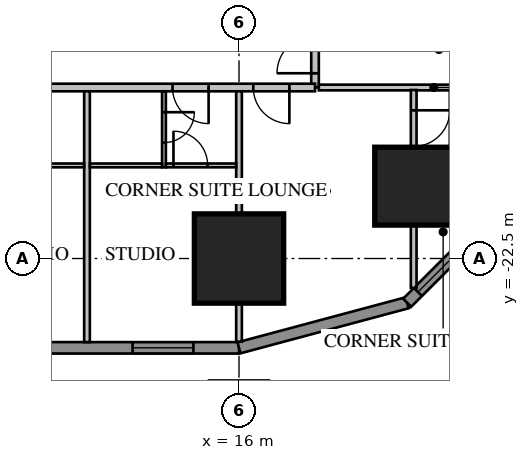
"""IFC4 building model, lengths in metres.
Left out: names, types, materials, properties, quantities, classifications, styles, units other than length and angle.
Written with IfcOpenShell. Run it as: python <this file> out.ifc"""

import sys

from ifc_helpers import new_model, si_unit, direction, frame, frame_2d, origin, origin_2d, place, context, subcontext, project, spatial, rectangle, extrude, element, fill, save


model = new_model("IFC4")
c1 = context("Model", 3, precision=1e-05, world=origin(), true_north=direction((0.0, 1.0)))
c2 = subcontext(c1, "Body", "Model", "MODEL_VIEW")
j1 = project(units=[si_unit("LENGTHUNIT", "METRE"), si_unit("PLANEANGLEUNIT", "RADIAN")], contexts=[c1])
p1 = place(None, origin())
s1 = spatial("IfcSite", under=j1, at=p1, CompositionType="ELEMENT")
p2 = place(p1, origin())
s2 = spatial("IfcBuilding", under=s1, at=p2, CompositionType="ELEMENT")
p3 = place(p2, frame((0.0, 0.0, 31.4)))
s3 = spatial("IfcBuildingStorey", under=s2, at=p3, CompositionType="ELEMENT", Elevation=31.4)
p4 = place(p3, frame((16.0, -22.5, 0.0), z_axis=(0.0, 0.0, 1.0), x_axis=(1.0, 0.0, 0.0)))
e1 = element("IfcColumn", 1, at=p4, inside=s3, PredefinedType="COLUMN", context=c2, shape_type="SweptSolid", body=[
    extrude(rectangle(XDim=2.35, YDim=2.35, at=origin_2d()), origin(), (0.0, 0.0, 1.0), 3.85),
])
p5 = place(p3, frame((20.596, -20.596, 0.0), z_axis=(0.0, 0.0, 1.0), x_axis=(1.0, 0.0, 0.0)))
e2 = element("IfcColumn", 2, at=p5, inside=s3, PredefinedType="COLUMN", context=c2, shape_type="SweptSolid", body=[
    extrude(rectangle(XDim=2.05, YDim=2.05, at=origin_2d()), origin(), (0.0, 0.0, 1.0), 3.85),
])
p6 = place(p3, frame((-16.0, -24.85, 0.0), z_axis=(0.0, 0.0, 1.0), x_axis=(1.0, 0.0, 0.0)))
e3 = element("IfcWall", 3, at=p6, inside=s3, PredefinedType="SOLIDWALL", context=c2, shape_type="SweptSolid", body=[
    extrude(rectangle(XDim=32.0, YDim=0.3, at=frame_2d((16.0, 0.0))), origin(), (0.0, 0.0, 1.0), 3.65),
])
p7 = place(p6, frame((1.2, 0.0, 0.75)))
e4 = element("IfcOpeningElement", 4, at=p7, cuts=e3, PredefinedType="OPENING", context=c2, shape_type="SweptSolid", body=[
    extrude(rectangle(XDim=1.6, YDim=1.8, at=frame_2d((0.8, 0.9))), frame((0.0, 0.17, 0.0), z_axis=(0.0, -1.0, 0.0), x_axis=(1.0, 0.0, 0.0)), (0.0, 0.0, 1.0), 0.34),
])
p8 = place(p6, frame((5.2, 0.0, 0.75)))
e5 = element("IfcOpeningElement", 5, at=p8, cuts=e3, PredefinedType="OPENING", context=c2, shape_type="SweptSolid", body=[
    extrude(rectangle(XDim=1.6, YDim=1.8, at=frame_2d((0.8, 0.9))), frame((0.0, 0.17, 0.0), z_axis=(0.0, -1.0, 0.0), x_axis=(1.0, 0.0, 0.0)), (0.0, 0.0, 1.0), 0.34),
])
p9 = place(p6, frame((17.2, 0.0, 0.75)))
e6 = element("IfcOpeningElement", 6, at=p9, cuts=e3, PredefinedType="OPENING", context=c2, shape_type="SweptSolid", body=[
    extrude(rectangle(XDim=1.6, YDim=1.8, at=frame_2d((0.8, 0.9))), frame((0.0, 0.17, 0.0), z_axis=(0.0, -1.0, 0.0), x_axis=(1.0, 0.0, 0.0)), (0.0, 0.0, 1.0), 0.34),
])
p10 = place(p6, frame((21.2, 0.0, 0.75)))
e7 = element("IfcOpeningElement", 7, at=p10, cuts=e3, PredefinedType="OPENING", context=c2, shape_type="SweptSolid", body=[
    extrude(rectangle(XDim=1.6, YDim=1.8, at=frame_2d((0.8, 0.9))), frame((0.0, 0.17, 0.0), z_axis=(0.0, -1.0, 0.0), x_axis=(1.0, 0.0, 0.0)), (0.0, 0.0, 1.0), 0.34),
])
p11 = place(p6, frame((25.2, 0.0, 0.75)))
e8 = element("IfcOpeningElement", 8, at=p11, cuts=e3, PredefinedType="OPENING", context=c2, shape_type="SweptSolid", body=[
    extrude(rectangle(XDim=1.6, YDim=1.8, at=frame_2d((0.8, 0.9))), frame((0.0, 0.17, 0.0), z_axis=(0.0, -1.0, 0.0), x_axis=(1.0, 0.0, 0.0)), (0.0, 0.0, 1.0), 0.34),
])
p12 = place(p6, frame((29.2, 0.0, 0.75)))
e9 = element("IfcOpeningElement", 9, at=p12, cuts=e3, PredefinedType="OPENING", context=c2, shape_type="SweptSolid", body=[
    extrude(rectangle(XDim=1.6, YDim=1.8, at=frame_2d((0.8, 0.9))), frame((0.0, 0.17, 0.0), z_axis=(0.0, -1.0, 0.0), x_axis=(1.0, 0.0, 0.0)), (0.0, 0.0, 1.0), 0.34),
])
p13 = place(p6, frame((8.8, 0.0, 0.75)))
e10 = element("IfcOpeningElement", 10, at=p13, cuts=e3, PredefinedType="OPENING", context=c2, shape_type="SweptSolid", body=[
    extrude(rectangle(XDim=2.4, YDim=1.8, at=frame_2d((1.2, 0.9))), frame((0.0, 0.17, 0.0), z_axis=(0.0, -1.0, 0.0), x_axis=(1.0, 0.0, 0.0)), (0.0, 0.0, 1.0), 0.34),
])
p14 = place(p6, frame((13.812, 0.0, 0.0)))
e11 = element("IfcOpeningElement", 11, at=p14, cuts=e3, PredefinedType="OPENING", context=c2, shape_type="SweptSolid", body=[
    extrude(rectangle(XDim=1.0, YDim=2.4, at=frame_2d((0.5, 1.2))), frame((0.0, 0.17, 0.0), z_axis=(0.0, -1.0, 0.0), x_axis=(1.0, 0.0, 0.0)), (0.0, 0.0, 1.0), 0.34),
])
p15 = place(p3, frame((16.0, -24.85, 0.0), z_axis=(0.0, 0.0, 1.0), x_axis=(0.965920218567, 0.258839972501, 0.0)))
e12 = element("IfcWall", 12, at=p15, inside=s3, PredefinedType="SOLIDWALL", context=c2, shape_type="SweptSolid", body=[
    extrude(rectangle(XDim=4.581, YDim=0.3, at=frame_2d((2.291, 0.0))), origin(), (0.0, 0.0, 1.0), 3.65),
])
p16 = place(p3, frame((20.425, -23.664, 0.0), z_axis=(0.0, 0.0, 1.0), x_axis=(0.707106781187, 0.707106781187, 0.0)))
e13 = element("IfcWall", 13, at=p16, inside=s3, PredefinedType="SOLIDWALL", context=c2, shape_type="SweptSolid", body=[
    extrude(rectangle(XDim=4.581, YDim=0.3, at=frame_2d((2.291, 0.0))), origin(), (0.0, 0.0, 1.0), 3.65),
])
p17 = place(p16, frame((0.4, 0.0, 0.75)))
e14 = element("IfcOpeningElement", 14, at=p17, cuts=e13, PredefinedType="OPENING", context=c2, shape_type="SweptSolid", body=[
    extrude(rectangle(XDim=3.781, YDim=1.8, at=frame_2d((1.891, 0.9))), frame((0.0, 0.17, 0.0), z_axis=(0.0, -1.0, 0.0), x_axis=(1.0, 0.0, 0.0)), (0.0, 0.0, 1.0), 0.34),
])
p18 = place(p3, frame((18.0, -18.0, 0.0), z_axis=(0.0, 0.0, 1.0), x_axis=(0.0, 1.0, 0.0)))
e15 = element("IfcWall", 15, at=p18, inside=s3, PredefinedType="PARTITIONING", context=c2, shape_type="SweptSolid", body=[
    extrude(rectangle(XDim=36.0, YDim=0.2, at=frame_2d((18.0, 0.0))), origin(), (0.0, 0.0, 1.0), 3.65),
])
p19 = place(p18, frame((10.4, 0.0, 0.0)))
e16 = element("IfcOpeningElement", 16, at=p19, cuts=e15, PredefinedType="OPENING", context=c2, shape_type="SweptSolid", body=[
    extrude(rectangle(XDim=1.0, YDim=2.1, at=frame_2d((0.5, 1.05))), frame((0.0, 0.12, 0.0), z_axis=(0.0, -1.0, 0.0), x_axis=(1.0, 0.0, 0.0)), (0.0, 0.0, 1.0), 0.24),
])
p20 = place(p18, frame((0.375, 0.0, 0.0)))
e17 = element("IfcOpeningElement", 17, at=p20, cuts=e15, PredefinedType="OPENING", context=c2, shape_type="SweptSolid", body=[
    extrude(rectangle(XDim=1.0, YDim=2.1, at=frame_2d((0.5, 1.05))), frame((0.0, 0.12, 0.0), z_axis=(0.0, -1.0, 0.0), x_axis=(1.0, 0.0, 0.0)), (0.0, 0.0, 1.0), 0.24),
])
p21 = place(p18, frame((34.375, 0.0, 0.0)))
e18 = element("IfcOpeningElement", 18, at=p21, cuts=e15, PredefinedType="OPENING", context=c2, shape_type="SweptSolid", body=[
    extrude(rectangle(XDim=0.95, YDim=2.1, at=frame_2d((0.475, 1.05))), frame((0.0, 0.12, 0.0), z_axis=(0.0, -1.0, 0.0), x_axis=(1.0, 0.0, 0.0)), (0.0, 0.0, 1.0), 0.24),
])
p22 = place(p3, frame((18.1, -18.0, 0.0), z_axis=(0.0, 0.0, 1.0), x_axis=(1.0, 0.0, 0.0)))
e19 = element("IfcWall", 19, at=p22, inside=s3, PredefinedType="PARTITIONING", context=c2, shape_type="SweptSolid", body=[
    extrude(rectangle(XDim=6.053, YDim=0.15, at=frame_2d((3.027, 0.0))), origin(), (0.0, 0.0, 1.0), 3.65),
])
p23 = place(p3, frame((-18.0, -18.0, 0.0), z_axis=(0.0, 0.0, 1.0), x_axis=(1.0, 0.0, 0.0)))
e20 = element("IfcWall", 20, at=p23, inside=s3, PredefinedType="PARTITIONING", context=c2, shape_type="SweptSolid", body=[
    extrude(rectangle(XDim=36.0, YDim=0.2, at=frame_2d((18.0, 0.0))), origin(), (0.0, 0.0, 1.0), 3.65),
])
p24 = place(p23, frame((0.375, 0.0, 0.0)))
e21 = element("IfcOpeningElement", 21, at=p24, cuts=e20, PredefinedType="OPENING", context=c2, shape_type="SweptSolid", body=[
    extrude(rectangle(XDim=1.0, YDim=2.1, at=frame_2d((0.5, 1.05))), frame((0.0, 0.12, 0.0), z_axis=(0.0, -1.0, 0.0), x_axis=(1.0, 0.0, 0.0)), (0.0, 0.0, 1.0), 0.24),
])
p25 = place(p23, frame((2.45, 0.0, 0.0)))
e22 = element("IfcOpeningElement", 22, at=p25, cuts=e20, PredefinedType="OPENING", context=c2, shape_type="SweptSolid", body=[
    extrude(rectangle(XDim=0.8, YDim=2.1, at=frame_2d((0.4, 1.05))), frame((0.0, 0.12, 0.0), z_axis=(0.0, -1.0, 0.0), x_axis=(1.0, 0.0, 0.0)), (0.0, 0.0, 1.0), 0.24),
])
p26 = place(p23, frame((4.05, 0.0, 0.0)))
e23 = element("IfcOpeningElement", 23, at=p26, cuts=e20, PredefinedType="OPENING", context=c2, shape_type="SweptSolid", body=[
    extrude(rectangle(XDim=1.0, YDim=2.1, at=frame_2d((0.5, 1.05))), frame((0.0, 0.12, 0.0), z_axis=(0.0, -1.0, 0.0), x_axis=(1.0, 0.0, 0.0)), (0.0, 0.0, 1.0), 0.24),
])
p27 = place(p23, frame((6.45, 0.0, 0.0)))
e24 = element("IfcOpeningElement", 24, at=p27, cuts=e20, PredefinedType="OPENING", context=c2, shape_type="SweptSolid", body=[
    extrude(rectangle(XDim=0.9, YDim=2.1, at=frame_2d((0.45, 1.05))), frame((0.0, 0.12, 0.0), z_axis=(0.0, -1.0, 0.0), x_axis=(1.0, 0.0, 0.0)), (0.0, 0.0, 1.0), 0.24),
])
p28 = place(p23, frame((8.15, 0.0, 0.0)))
e25 = element("IfcOpeningElement", 25, at=p28, cuts=e20, PredefinedType="OPENING", context=c2, shape_type="SweptSolid", body=[
    extrude(rectangle(XDim=1.0, YDim=2.1, at=frame_2d((0.5, 1.05))), frame((0.0, 0.12, 0.0), z_axis=(0.0, -1.0, 0.0), x_axis=(1.0, 0.0, 0.0)), (0.0, 0.0, 1.0), 0.24),
])
p29 = place(p23, frame((18.375, 0.0, 0.0)))
e26 = element("IfcOpeningElement", 26, at=p29, cuts=e20, PredefinedType="OPENING", context=c2, shape_type="SweptSolid", body=[
    extrude(rectangle(XDim=0.95, YDim=2.1, at=frame_2d((0.475, 1.05))), frame((0.0, 0.12, 0.0), z_axis=(0.0, -1.0, 0.0), x_axis=(1.0, 0.0, 0.0)), (0.0, 0.0, 1.0), 0.24),
])
p30 = place(p23, frame((24.25, 0.0, 0.0)))
e27 = element("IfcOpeningElement", 27, at=p30, cuts=e20, PredefinedType="OPENING", context=c2, shape_type="SweptSolid", body=[
    extrude(rectangle(XDim=0.95, YDim=2.1, at=frame_2d((0.475, 1.05))), frame((0.0, 0.12, 0.0), z_axis=(0.0, -1.0, 0.0), x_axis=(1.0, 0.0, 0.0)), (0.0, 0.0, 1.0), 0.24),
])
p31 = place(p23, frame((26.375, 0.0, 0.0)))
e28 = element("IfcOpeningElement", 28, at=p31, cuts=e20, PredefinedType="OPENING", context=c2, shape_type="SweptSolid", body=[
    extrude(rectangle(XDim=0.95, YDim=2.1, at=frame_2d((0.475, 1.05))), frame((0.0, 0.12, 0.0), z_axis=(0.0, -1.0, 0.0), x_axis=(1.0, 0.0, 0.0)), (0.0, 0.0, 1.0), 0.24),
])
p32 = place(p23, frame((32.25, 0.0, 0.0)))
e29 = element("IfcOpeningElement", 29, at=p32, cuts=e20, PredefinedType="OPENING", context=c2, shape_type="SweptSolid", body=[
    extrude(rectangle(XDim=0.95, YDim=2.1, at=frame_2d((0.475, 1.05))), frame((0.0, 0.12, 0.0), z_axis=(0.0, -1.0, 0.0), x_axis=(1.0, 0.0, 0.0)), (0.0, 0.0, 1.0), 0.24),
])
p33 = place(p23, frame((34.375, 0.0, 0.0)))
e30 = element("IfcOpeningElement", 30, at=p33, cuts=e20, PredefinedType="OPENING", context=c2, shape_type="SweptSolid", body=[
    extrude(rectangle(XDim=0.95, YDim=2.1, at=frame_2d((0.475, 1.05))), frame((0.0, 0.12, 0.0), z_axis=(0.0, -1.0, 0.0), x_axis=(1.0, 0.0, 0.0)), (0.0, 0.0, 1.0), 0.24),
])
p34 = place(p23, frame((11.2, 0.0, 0.0)))
e31 = element("IfcOpeningElement", 31, at=p34, cuts=e20, PredefinedType="OPENING", context=c2, shape_type="SweptSolid", body=[
    extrude(rectangle(XDim=1.0, YDim=2.1, at=frame_2d((0.5, 1.05))), frame((0.0, 0.12, 0.0), z_axis=(0.0, -1.0, 0.0), x_axis=(1.0, 0.0, 0.0)), (0.0, 0.0, 1.0), 0.24),
])
p35 = place(p3, frame((12.0, -18.1, 0.0), z_axis=(0.0, 0.0, 1.0), x_axis=(0.0, -1.0, 0.0)))
e32 = element("IfcWall", 32, at=p35, inside=s3, PredefinedType="PARTITIONING", context=c2, shape_type="SweptSolid", body=[
    extrude(rectangle(XDim=6.6, YDim=0.15, at=frame_2d((3.3, 0.0))), origin(), (0.0, 0.0, 1.0), 3.65),
])
p36 = place(p3, frame((16.0, -18.1, 0.0), z_axis=(0.0, 0.0, 1.0), x_axis=(0.0, -1.0, 0.0)))
e33 = element("IfcWall", 33, at=p36, inside=s3, PredefinedType="PARTITIONING", context=c2, shape_type="SweptSolid", body=[
    extrude(rectangle(XDim=6.589, YDim=0.15, at=frame_2d((3.295, 0.0))), origin(), (0.0, 0.0, 1.0), 3.65),
])
p37 = place(p3, frame((10.025, -20.05, 0.0), z_axis=(0.0, 0.0, 1.0), x_axis=(1.0, 0.0, 0.0)))
e34 = element("IfcWall", 34, at=p37, inside=s3, PredefinedType="PARTITIONING", context=c2, shape_type="SweptSolid", body=[
    extrude(rectangle(XDim=1.9, YDim=0.1, at=frame_2d((0.95, 0.0))), origin(), (0.0, 0.0, 1.0), 3.65),
])
p38 = place(p3, frame((14.025, -18.1, 0.0), z_axis=(0.0, 0.0, 1.0), x_axis=(0.0, -1.0, 0.0)))
e35 = element("IfcWall", 35, at=p38, inside=s3, PredefinedType="PARTITIONING", context=c2, shape_type="SweptSolid", body=[
    extrude(rectangle(XDim=2.0, YDim=0.1, at=frame_2d((1.0, 0.0))), origin(), (0.0, 0.0, 1.0), 3.65),
])
p39 = place(p38, frame((0.55, 0.0, 0.0)))
e36 = element("IfcOpeningElement", 36, at=p39, cuts=e35, PredefinedType="OPENING", context=c2, shape_type="SweptSolid", body=[
    extrude(rectangle(XDim=0.8, YDim=2.1, at=frame_2d((0.4, 1.05))), frame((0.0, 0.07, 0.0), z_axis=(0.0, -1.0, 0.0), x_axis=(1.0, 0.0, 0.0)), (0.0, 0.0, 1.0), 0.14),
])
p40 = place(p3, frame((12.075, -20.05, 0.0), z_axis=(0.0, 0.0, 1.0), x_axis=(1.0, 0.0, 0.0)))
e37 = element("IfcWall", 37, at=p40, inside=s3, PredefinedType="PARTITIONING", context=c2, shape_type="SweptSolid", body=[
    extrude(rectangle(XDim=1.9, YDim=0.1, at=frame_2d((0.95, 0.0))), origin(), (0.0, 0.0, 1.0), 3.65),
])
p41 = place(p3, frame((20.596, -18.065, 0.0), z_axis=(0.0, 0.0, 1.0), x_axis=(0.0, -1.0, 0.0)))
e38 = element("IfcWall", 38, at=p41, inside=s3, PredefinedType="PARTITIONING", context=c2, shape_type="SweptSolid", body=[
    extrude(rectangle(XDim=5.209, YDim=0.15, at=frame_2d((2.604, 0.0))), origin(), (0.0, 0.0, 1.0), 3.65),
])
p42 = place(p41, frame((0.535, 0.0, 0.0)))
e39 = element("IfcOpeningElement", 39, at=p42, cuts=e38, PredefinedType="OPENING", context=c2, shape_type="SweptSolid", body=[
    extrude(rectangle(XDim=0.95, YDim=2.1, at=frame_2d((0.475, 1.05))), frame((0.0, 0.095, 0.0), z_axis=(0.0, -1.0, 0.0), x_axis=(1.0, 0.0, 0.0)), (0.0, 0.0, 1.0), 0.19),
])
p43 = place(p3, frame((14.075, -20.05, 0.0), z_axis=(0.0, 0.0, 1.0), x_axis=(1.0, 0.0, 0.0)))
e40 = element("IfcWall", 40, at=p43, inside=s3, PredefinedType="PARTITIONING", context=c2, shape_type="SweptSolid", body=[
    extrude(rectangle(XDim=1.85, YDim=0.1, at=frame_2d((0.925, 0.0))), origin(), (0.0, 0.0, 1.0), 3.65),
])
p44 = place(p43, frame((0.2, 0.0, 0.0)))
e41 = element("IfcOpeningElement", 41, at=p44, cuts=e40, PredefinedType="OPENING", context=c2, shape_type="SweptSolid", body=[
    extrude(rectangle(XDim=0.9, YDim=2.1, at=frame_2d((0.45, 1.05))), frame((0.0, 0.07, 0.0), z_axis=(0.0, -1.0, 0.0), x_axis=(1.0, 0.0, 0.0)), (0.0, 0.0, 1.0), 0.14),
])
p45 = place(p12, origin())
e42 = element("IfcWindow", 42, at=p45, inside=s3, PartitioningType="SINGLE_PANEL", PredefinedType="WINDOW", context=c2, shape_type="SweptSolid", body=[
    extrude(rectangle(XDim=1.6, YDim=1.8, at=frame_2d((0.8, 0.9))), frame((0.0, 0.03, 0.0), z_axis=(0.0, -1.0, 0.0), x_axis=(1.0, 0.0, 0.0)), (0.0, 0.0, 1.0), 0.06),
])
fill(e9, e42)
p46 = place(p17, origin())
e43 = element("IfcWindow", 43, at=p46, inside=s3, PartitioningType="SINGLE_PANEL", PredefinedType="WINDOW", context=c2, shape_type="SweptSolid", body=[
    extrude(rectangle(XDim=3.781, YDim=1.8, at=frame_2d((1.891, 0.9))), frame((0.0, 0.03, 0.0), z_axis=(0.0, -1.0, 0.0), x_axis=(1.0, 0.0, 0.0)), (0.0, 0.0, 1.0), 0.06),
])
fill(e14, e43)
p47 = place(p20, origin())
e44 = element("IfcDoor", 44, at=p47, inside=s3, OperationType="SINGLE_SWING_LEFT", PredefinedType="DOOR", context=c2, shape_type="SweptSolid", body=[
    extrude(rectangle(XDim=1.0, YDim=2.1, at=frame_2d((0.5, 1.05))), frame((0.0, 0.025, 0.0), z_axis=(0.0, -1.0, 0.0), x_axis=(1.0, 0.0, 0.0)), (0.0, 0.0, 1.0), 0.05),
])
fill(e17, e44)
p48 = place(p32, origin())
e45 = element("IfcDoor", 45, at=p48, inside=s3, OperationType="SINGLE_SWING_RIGHT", PredefinedType="DOOR", context=c2, shape_type="SweptSolid", body=[
    extrude(rectangle(XDim=0.95, YDim=2.1, at=frame_2d((0.475, 1.05))), frame((0.0, 0.025, 0.0), z_axis=(0.0, -1.0, 0.0), x_axis=(1.0, 0.0, 0.0)), (0.0, 0.0, 1.0), 0.05),
])
fill(e29, e45)
p49 = place(p39, origin())
e46 = element("IfcDoor", 46, at=p49, inside=s3, OperationType="SINGLE_SWING_LEFT", PredefinedType="DOOR", context=c2, shape_type="SweptSolid", body=[
    extrude(rectangle(XDim=0.8, YDim=2.1, at=frame_2d((0.4, 1.05))), frame((0.0, 0.025, 0.0), z_axis=(0.0, -1.0, 0.0), x_axis=(1.0, 0.0, 0.0)), (0.0, 0.0, 1.0), 0.05),
])
fill(e36, e46)
p50 = place(p33, origin())
e47 = element("IfcDoor", 47, at=p50, inside=s3, OperationType="SINGLE_SWING_RIGHT", PredefinedType="DOOR", context=c2, shape_type="SweptSolid", body=[
    extrude(rectangle(XDim=0.95, YDim=2.1, at=frame_2d((0.475, 1.05))), frame((0.0, 0.025, 0.0), z_axis=(0.0, -1.0, 0.0), x_axis=(1.0, 0.0, 0.0)), (0.0, 0.0, 1.0), 0.05),
])
fill(e30, e47)
p51 = place(p42, origin())
e48 = element("IfcDoor", 48, at=p51, inside=s3, OperationType="SINGLE_SWING_LEFT", PredefinedType="DOOR", context=c2, shape_type="SweptSolid", body=[
    extrude(rectangle(XDim=0.95, YDim=2.1, at=frame_2d((0.475, 1.05))), frame((0.0, 0.025, 0.0), z_axis=(0.0, -1.0, 0.0), x_axis=(1.0, 0.0, 0.0)), (0.0, 0.0, 1.0), 0.05),
])
fill(e39, e48)
p52 = place(p44, origin())
e49 = element("IfcDoor", 49, at=p52, inside=s3, OperationType="SINGLE_SWING_LEFT", PredefinedType="DOOR", context=c2, shape_type="SweptSolid", body=[
    extrude(rectangle(XDim=0.9, YDim=2.1, at=frame_2d((0.45, 1.05))), frame((0.0, 0.025, 0.0), z_axis=(0.0, -1.0, 0.0), x_axis=(1.0, 0.0, 0.0)), (0.0, 0.0, 1.0), 0.05),
])
fill(e41, e49)
save(model, sys.argv[1])
